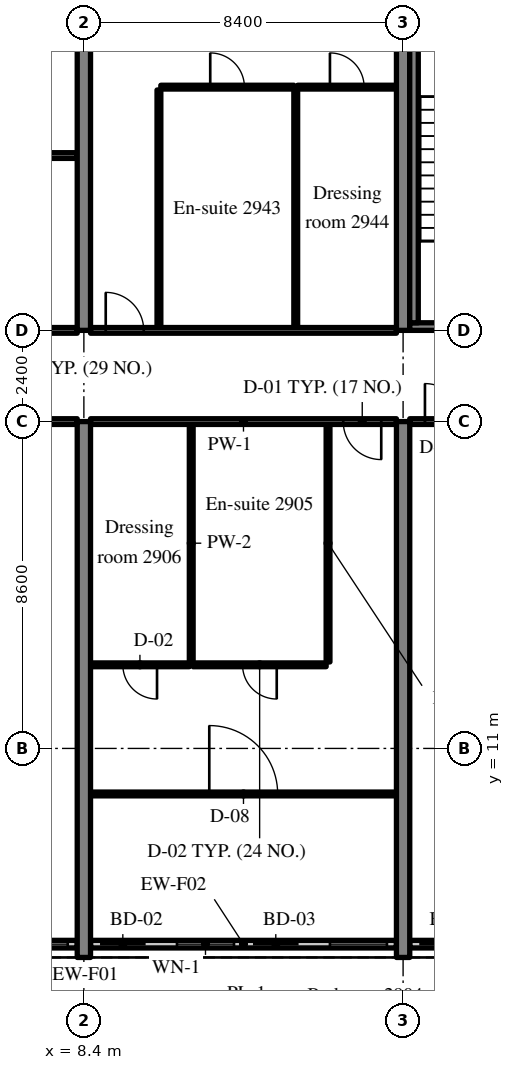
"""IFC4 building model, lengths in metres.
Left out: names, types, materials, properties, quantities, classifications, styles, units other than length and angle.
Written with IfcOpenShell. Run it as: python <this file> out.ifc"""

import sys

from ifc_helpers import new_model, si_unit, direction, frame, frame_2d, origin, place, context, subcontext, project, spatial, rectangle, extrude, source, transform, mapped, element, fill, save


model = new_model("IFC4")
c1 = context("Model", 3, precision=1e-05, world=origin(), true_north=direction((0.0, 1.0)))
c2 = subcontext(c1, "Body", "Model", "MODEL_VIEW")
j1 = project(units=[si_unit("LENGTHUNIT", "METRE"), si_unit("PLANEANGLEUNIT", "RADIAN")], contexts=[c1])
p1 = place(None, origin())
s1 = spatial("IfcSite", under=j1, at=p1, CompositionType="ELEMENT")
p2 = place(p1, origin())
s2 = spatial("IfcBuilding", under=s1, at=p2, CompositionType="ELEMENT")
p3 = place(p2, frame((0.0, 0.0, 121.8)))
s3 = spatial("IfcBuildingStorey", under=s2, at=p3, CompositionType="ELEMENT", Elevation=121.8)
m1 = source(origin(), c2, "Body", "SweptSolid", [
    extrude(rectangle(XDim=14.1, YDim=0.35, at=frame_2d((7.05, 0.0))), origin(), (0.0, 0.0, 1.0), 3.52),
])
p4 = place(p3, frame((8.4, 5.5, 0.0), z_axis=(0.0, 0.0, 1.0), x_axis=(0.0, 1.0, 0.0)))
e1 = element("IfcWall", 1, at=p4, inside=s3, PredefinedType="SHEAR", context=c2, shape_type="MappedRepresentation", body=[
    mapped(m1, transform((0.0, 0.0, 0.0), scale=1.0)),
])
m2 = source(origin(), c2, "Body", "SweptSolid", [
    extrude(rectangle(XDim=20.0, YDim=0.35, at=frame_2d((10.0, 0.0))), origin(), (0.0, 0.0, 1.0), 3.52),
])
p5 = place(p3, frame((8.4, 22.0, 0.0), z_axis=(0.0, 0.0, 1.0), x_axis=(0.0, 1.0, 0.0)))
e2 = element("IfcWall", 2, at=p5, inside=s3, PredefinedType="SHEAR", context=c2, shape_type="MappedRepresentation", body=[
    mapped(m2, transform((0.0, 0.0, 0.0), scale=1.0)),
])
p6 = place(p3, frame((16.8, 5.5, 0.0), z_axis=(0.0, 0.0, 1.0), x_axis=(0.0, 1.0, 0.0)))
e3 = element("IfcWall", 3, at=p6, inside=s3, PredefinedType="SHEAR", context=c2, shape_type="MappedRepresentation", body=[
    mapped(m1, transform((0.0, 0.0, 0.0), scale=1.0)),
])
p7 = place(p3, frame((16.8, 22.0, 0.0), z_axis=(0.0, 0.0, 1.0), x_axis=(0.0, 1.0, 0.0)))
e4 = element("IfcWall", 4, at=p7, inside=s3, PredefinedType="SHEAR", context=c2, shape_type="MappedRepresentation", body=[
    mapped(m2, transform((0.0, 0.0, 0.0), scale=1.0)),
])
m3 = source(origin(), c2, "Body", "SweptSolid", [
    extrude(rectangle(XDim=4.08, YDim=0.2, at=frame_2d((2.04, 0.0))), origin(), (0.0, 0.0, 1.0), 2.82),
])
p8 = place(p3, frame((4.145, 5.85, 0.0), z_axis=(0.0, 0.0, 1.0), x_axis=(1.0, 0.0, 0.0)))
e5 = element("IfcWall", 5, at=p8, inside=s3, PredefinedType="SOLIDWALL", context=c2, shape_type="MappedRepresentation", body=[
    mapped(m3, transform((0.0, 0.0, 0.0), scale=1.0)),
])
m4 = source(origin(), c2, "Body", "SweptSolid", [
    extrude(rectangle(XDim=1.2, YDim=2.4, at=frame_2d((0.6, 1.2))), frame((0.0, 0.11, 0.0), z_axis=(0.0, -1.0, 0.0), x_axis=(1.0, 0.0, 0.0)), (0.0, 0.0, 1.0), 0.22),
])
p9 = place(p8, frame((0.25, 0.0, 0.0)))
e6 = element("IfcOpeningElement", 6, at=p9, cuts=e5, PredefinedType="OPENING", context=c2, shape_type="MappedRepresentation", body=[
    mapped(m4, transform((0.0, 0.0, 0.0), scale=1.0)),
])
m5 = source(origin(), c2, "Body", "SweptSolid", [
    extrude(rectangle(XDim=1.5, YDim=1.5, at=frame_2d((0.75, 0.75))), frame((0.0, 0.11, 0.0), z_axis=(0.0, -1.0, 0.0), x_axis=(1.0, 0.0, 0.0)), (0.0, 0.0, 1.0), 0.22),
])
p10 = place(p8, frame((2.33, 0.0, 0.9)))
e7 = element("IfcOpeningElement", 7, at=p10, cuts=e5, PredefinedType="OPENING", context=c2, shape_type="MappedRepresentation", body=[
    mapped(m5, transform((0.0, 0.0, 0.0), scale=1.0)),
])
m6 = source(origin(), c2, "Body", "SweptSolid", [
    extrude(rectangle(XDim=8.05, YDim=0.2, at=frame_2d((4.025, 0.0))), origin(), (0.0, 0.0, 1.0), 2.82),
])
p11 = place(p3, frame((8.575, 5.85, 0.0), z_axis=(0.0, 0.0, 1.0), x_axis=(1.0, 0.0, 0.0)))
e8 = element("IfcWall", 8, at=p11, inside=s3, PredefinedType="SOLIDWALL", context=c2, shape_type="MappedRepresentation", body=[
    mapped(m6, transform((0.0, 0.0, 0.0), scale=1.0)),
])
p12 = place(p11, frame((0.25, 0.0, 0.0)))
e9 = element("IfcOpeningElement", 9, at=p12, cuts=e8, PredefinedType="OPENING", context=c2, shape_type="MappedRepresentation", body=[
    mapped(m4, transform((0.0, 0.0, 0.0), scale=1.0)),
])
p13 = place(p11, frame((2.275, 0.0, 0.9)))
e10 = element("IfcOpeningElement", 10, at=p13, cuts=e8, PredefinedType="OPENING", context=c2, shape_type="MappedRepresentation", body=[
    mapped(m5, transform((0.0, 0.0, 0.0), scale=1.0)),
])
p14 = place(p11, frame((4.275, 0.0, 0.0)))
e11 = element("IfcOpeningElement", 11, at=p14, cuts=e8, PredefinedType="OPENING", context=c2, shape_type="MappedRepresentation", body=[
    mapped(m4, transform((0.0, 0.0, 0.0), scale=1.0)),
])
p15 = place(p11, frame((6.3, 0.0, 0.9)))
e12 = element("IfcOpeningElement", 12, at=p15, cuts=e8, PredefinedType="OPENING", context=c2, shape_type="MappedRepresentation", body=[
    mapped(m5, transform((0.0, 0.0, 0.0), scale=1.0)),
])
m7 = source(origin(), c2, "Body", "SweptSolid", [
    extrude(rectangle(XDim=8.05, YDim=0.2, at=frame_2d((4.025, 0.0))), origin(), (0.0, 0.0, 1.0), 2.82),
])
p16 = place(p3, frame((16.975, 5.85, 0.0), z_axis=(0.0, 0.0, 1.0), x_axis=(1.0, 0.0, 0.0)))
e13 = element("IfcWall", 13, at=p16, inside=s3, PredefinedType="SOLIDWALL", context=c2, shape_type="MappedRepresentation", body=[
    mapped(m7, transform((0.0, 0.0, 0.0), scale=1.0)),
])
p17 = place(p16, frame((0.25, 0.0, 0.0)))
e14 = element("IfcOpeningElement", 14, at=p17, cuts=e13, PredefinedType="OPENING", context=c2, shape_type="MappedRepresentation", body=[
    mapped(m4, transform((0.0, 0.0, 0.0), scale=1.0)),
])
p18 = place(p16, frame((2.275, 0.0, 0.9)))
e15 = element("IfcOpeningElement", 15, at=p18, cuts=e13, PredefinedType="OPENING", context=c2, shape_type="MappedRepresentation", body=[
    mapped(m5, transform((0.0, 0.0, 0.0), scale=1.0)),
])
p19 = place(p16, frame((4.275, 0.0, 0.0)))
e16 = element("IfcOpeningElement", 16, at=p19, cuts=e13, PredefinedType="OPENING", context=c2, shape_type="MappedRepresentation", body=[
    mapped(m4, transform((0.0, 0.0, 0.0), scale=1.0)),
])
p20 = place(p16, frame((6.3, 0.0, 0.9)))
e17 = element("IfcOpeningElement", 17, at=p20, cuts=e13, PredefinedType="OPENING", context=c2, shape_type="MappedRepresentation", body=[
    mapped(m5, transform((0.0, 0.0, 0.0), scale=1.0)),
])
m8 = source(origin(), c2, "Body", "SweptSolid", [
    extrude(rectangle(XDim=8.225, YDim=0.2, at=frame_2d((4.112, 0.0))), origin(), (0.0, 0.0, 1.0), 3.52),
])
p21 = place(p3, frame((16.975, 22.1, 0.0), z_axis=(0.0, 0.0, 1.0), x_axis=(1.0, 0.0, 0.0)))
e18 = element("IfcWall", 18, at=p21, inside=s3, PredefinedType="SOLIDWALL", context=c2, shape_type="MappedRepresentation", body=[
    mapped(m8, transform((0.0, 0.0, 0.0), scale=1.0)),
])
m9 = source(origin(), c2, "Body", "SweptSolid", [
    extrude(rectangle(XDim=1.2, YDim=2.1, at=frame_2d((0.6, 1.05))), frame((0.0, 0.11, 0.0), z_axis=(0.0, -1.0, 0.0), x_axis=(1.0, 0.0, 0.0)), (0.0, 0.0, 1.0), 0.22),
])
p22 = place(p21, frame((6.025, 0.0, 0.0)))
e19 = element("IfcOpeningElement", 19, at=p22, cuts=e18, PredefinedType="OPENING", context=c2, shape_type="MappedRepresentation", body=[
    mapped(m9, transform((0.0, 0.0, 0.0), scale=1.0)),
])
m10 = source(origin(), c2, "Body", "SweptSolid", [
    extrude(rectangle(XDim=8.1, YDim=0.225, at=frame_2d((4.05, 0.0))), origin(), (0.0, 0.0, 1.0), 3.52),
])
p23 = place(p3, frame((17.087, 22.2, 0.0), z_axis=(0.0, 0.0, 1.0), x_axis=(0.0, 1.0, 0.0)))
e20 = element("IfcWall", 20, at=p23, inside=s3, PredefinedType="SOLIDWALL", context=c2, shape_type="MappedRepresentation", body=[
    mapped(m10, transform((0.0, 0.0, 0.0), scale=1.0)),
])
m11 = source(origin(), c2, "Body", "SweptSolid", [
    extrude(rectangle(XDim=7.875, YDim=0.15, at=frame_2d((3.938, 0.0))), origin(), (0.0, 0.0, 1.0), 2.82),
])
p24 = place(p3, frame((0.35, 19.6, 0.0), z_axis=(0.0, 0.0, 1.0), x_axis=(1.0, 0.0, 0.0)))
e21 = element("IfcWall", 21, at=p24, inside=s3, PredefinedType="PARTITIONING", context=c2, shape_type="MappedRepresentation", body=[
    mapped(m11, transform((0.0, 0.0, 0.0), scale=1.0)),
])
m12 = source(origin(), c2, "Body", "SweptSolid", [
    extrude(rectangle(XDim=1.8, YDim=2.1, at=frame_2d((0.9, 1.05))), frame((0.0, 0.085, 0.0), z_axis=(0.0, -1.0, 0.0), x_axis=(1.0, 0.0, 0.0)), (0.0, 0.0, 1.0), 0.17),
])
p25 = place(p24, frame((3.037, 0.0, 0.0)))
e22 = element("IfcOpeningElement", 22, at=p25, cuts=e21, PredefinedType="OPENING", context=c2, shape_type="MappedRepresentation", body=[
    mapped(m12, transform((0.0, 0.0, 0.0), scale=1.0)),
])
m13 = source(origin(), c2, "Body", "SweptSolid", [
    extrude(rectangle(XDim=6.25, YDim=0.1, at=frame_2d((3.125, 0.0))), origin(), (0.0, 0.0, 1.0), 3.52),
])
for number, where, z_axis, x_axis in (
    (23, (14.825, 13.275, 0.0), (0.0, 0.0, 1.0), (0.0, 1.0, 0.0)),
    (24, (11.225, 13.275, 0.0), (0.0, 0.0, 1.0), (0.0, 1.0, 0.0)),
):
    element("IfcWall", number, at=place(p3, frame(where, z_axis=z_axis, x_axis=x_axis)), inside=s3, PredefinedType="PARTITIONING", context=c2, shape_type="MappedRepresentation", body=[
        mapped(m13, transform((0.0, 0.0, 0.0), scale=1.0)),
    ])
m14 = source(origin(), c2, "Body", "SweptSolid", [
    extrude(rectangle(XDim=3.5, YDim=0.1, at=frame_2d((1.75, 0.0))), origin(), (0.0, 0.0, 1.0), 3.52),
])
p26 = place(p3, frame((11.275, 13.2, 0.0), z_axis=(0.0, 0.0, 1.0), x_axis=(1.0, 0.0, 0.0)))
e25 = element("IfcWall", 25, at=p26, inside=s3, PredefinedType="PARTITIONING", context=c2, shape_type="MappedRepresentation", body=[
    mapped(m14, transform((0.0, 0.0, 0.0), scale=1.0)),
])
m15 = source(origin(), c2, "Body", "SweptSolid", [
    extrude(rectangle(XDim=0.9, YDim=2.1, at=frame_2d((0.45, 1.05))), frame((0.0, 0.06, 0.0), z_axis=(0.0, -1.0, 0.0), x_axis=(1.0, 0.0, 0.0)), (0.0, 0.0, 1.0), 0.12),
])
p27 = place(p26, frame((1.3, 0.0, 0.0)))
e26 = element("IfcOpeningElement", 26, at=p27, cuts=e25, PredefinedType="OPENING", context=c2, shape_type="MappedRepresentation", body=[
    mapped(m15, transform((0.0, 0.0, 0.0), scale=1.0)),
])
m16 = source(origin(), c2, "Body", "SweptSolid", [
    extrude(rectangle(XDim=2.6, YDim=0.1, at=frame_2d((1.3, 0.0))), origin(), (0.0, 0.0, 1.0), 3.52),
])
p28 = place(p3, frame((8.575, 13.2, 0.0), z_axis=(0.0, 0.0, 1.0), x_axis=(1.0, 0.0, 0.0)))
e27 = element("IfcWall", 27, at=p28, inside=s3, PredefinedType="PARTITIONING", context=c2, shape_type="MappedRepresentation", body=[
    mapped(m16, transform((0.0, 0.0, 0.0), scale=1.0)),
])
p29 = place(p28, frame((0.85, 0.0, 0.0)))
e28 = element("IfcOpeningElement", 28, at=p29, cuts=e27, PredefinedType="OPENING", context=c2, shape_type="MappedRepresentation", body=[
    mapped(m15, transform((0.0, 0.0, 0.0), scale=1.0)),
])
m17 = source(origin(), c2, "Body", "SweptSolid", [
    extrude(rectangle(XDim=8.05, YDim=0.1, at=frame_2d((4.025, 0.0))), origin(), (0.0, 0.0, 1.0), 3.52),
])
p30 = place(p3, frame((8.575, 9.802, 0.0), z_axis=(0.0, 0.0, 1.0), x_axis=(1.0, 0.0, 0.0)))
e29 = element("IfcWall", 29, at=p30, inside=s3, PredefinedType="PARTITIONING", context=c2, shape_type="MappedRepresentation", body=[
    mapped(m17, transform((0.0, 0.0, 0.0), scale=1.0)),
])
m18 = source(origin(), c2, "Body", "SweptSolid", [
    extrude(rectangle(XDim=1.8, YDim=2.1, at=frame_2d((0.9, 1.05))), frame((0.0, 0.06, 0.0), z_axis=(0.0, -1.0, 0.0), x_axis=(1.0, 0.0, 0.0)), (0.0, 0.0, 1.0), 0.12),
])
p31 = place(p30, frame((3.125, 0.0, 0.0)))
e30 = element("IfcOpeningElement", 30, at=p31, cuts=e29, PredefinedType="OPENING", context=c2, shape_type="MappedRepresentation", body=[
    mapped(m18, transform((0.0, 0.0, 0.0), scale=1.0)),
])
m19 = source(origin(), c2, "Body", "SweptSolid", [
    extrude(rectangle(XDim=8.05, YDim=0.15, at=frame_2d((4.025, 0.0))), origin(), (0.0, 0.0, 1.0), 2.82),
])
p32 = place(p3, frame((8.575, 19.6, 0.0), z_axis=(0.0, 0.0, 1.0), x_axis=(1.0, 0.0, 0.0)))
e31 = element("IfcWall", 31, at=p32, inside=s3, PredefinedType="PARTITIONING", context=c2, shape_type="MappedRepresentation", body=[
    mapped(m19, transform((0.0, 0.0, 0.0), scale=1.0)),
])
m20 = source(origin(), c2, "Body", "SweptSolid", [
    extrude(rectangle(XDim=1.0, YDim=2.1, at=frame_2d((0.5, 1.05))), frame((0.0, 0.085, 0.0), z_axis=(0.0, -1.0, 0.0), x_axis=(1.0, 0.0, 0.0)), (0.0, 0.0, 1.0), 0.17),
])
p33 = place(p32, frame((6.65, 0.0, 0.0)))
e32 = element("IfcOpeningElement", 32, at=p33, cuts=e31, PredefinedType="OPENING", context=c2, shape_type="MappedRepresentation", body=[
    mapped(m20, transform((0.0, 0.0, 0.0), scale=1.0)),
])
m21 = source(origin(), c2, "Body", "SweptSolid", [
    extrude(rectangle(XDim=8.05, YDim=0.15, at=frame_2d((4.025, 0.0))), origin(), (0.0, 0.0, 1.0), 2.82),
])
p34 = place(p3, frame((16.975, 19.6, 0.0), z_axis=(0.0, 0.0, 1.0), x_axis=(1.0, 0.0, 0.0)))
e33 = element("IfcWall", 33, at=p34, inside=s3, PredefinedType="PARTITIONING", context=c2, shape_type="MappedRepresentation", body=[
    mapped(m21, transform((0.0, 0.0, 0.0), scale=1.0)),
])
p35 = place(p34, frame((0.4, 0.0, 0.0)))
e34 = element("IfcOpeningElement", 34, at=p35, cuts=e33, PredefinedType="OPENING", context=c2, shape_type="MappedRepresentation", body=[
    mapped(m20, transform((0.0, 0.0, 0.0), scale=1.0)),
])
m22 = source(origin(), c2, "Body", "SweptSolid", [
    extrude(rectangle(XDim=5.325, YDim=0.15, at=frame_2d((2.663, 0.0))), origin(), (0.0, 0.0, 1.0), 2.82),
])
p36 = place(p3, frame((2.9, 22.0, 0.0), z_axis=(0.0, 0.0, 1.0), x_axis=(1.0, 0.0, 0.0)))
e35 = element("IfcWall", 35, at=p36, inside=s3, PredefinedType="PARTITIONING", context=c2, shape_type="MappedRepresentation", body=[
    mapped(m22, transform((0.0, 0.0, 0.0), scale=1.0)),
])
m23 = source(origin(), c2, "Body", "SweptSolid", [
    extrude(rectangle(XDim=5.325, YDim=0.15, at=frame_2d((2.663, 0.0))), origin(), (0.0, 0.0, 1.0), 3.52),
])
p37 = place(p3, frame((2.9, 26.6, 0.0), z_axis=(0.0, 0.0, 1.0), x_axis=(1.0, 0.0, 0.0)))
e36 = element("IfcWall", 36, at=p37, inside=s3, PredefinedType="PARTITIONING", context=c2, shape_type="MappedRepresentation", body=[
    mapped(m23, transform((0.0, 0.0, 0.0), scale=1.0)),
])
for number, where, z_axis, x_axis in (
    (37, (10.375, 22.075, 0.0), (0.0, 0.0, 1.0), (0.0, 1.0, 0.0)),
    (38, (13.975, 22.075, 0.0), (0.0, 0.0, 1.0), (0.0, 1.0, 0.0)),
):
    element("IfcWall", number, at=place(p3, frame(where, z_axis=z_axis, x_axis=x_axis)), inside=s3, PredefinedType="PARTITIONING", context=c2, shape_type="MappedRepresentation", body=[
        mapped(m13, transform((0.0, 0.0, 0.0), scale=1.0)),
    ])
p38 = place(p3, frame((10.425, 28.4, 0.0), z_axis=(0.0, 0.0, 1.0), x_axis=(1.0, 0.0, 0.0)))
e39 = element("IfcWall", 39, at=p38, inside=s3, PredefinedType="PARTITIONING", context=c2, shape_type="MappedRepresentation", body=[
    mapped(m14, transform((0.0, 0.0, 0.0), scale=1.0)),
])
p39 = place(p38, frame((1.3, 0.0, 0.0)))
e40 = element("IfcOpeningElement", 40, at=p39, cuts=e39, PredefinedType="OPENING", context=c2, shape_type="MappedRepresentation", body=[
    mapped(m15, transform((0.0, 0.0, 0.0), scale=1.0)),
])
p40 = place(p3, frame((14.025, 28.4, 0.0), z_axis=(0.0, 0.0, 1.0), x_axis=(1.0, 0.0, 0.0)))
e41 = element("IfcWall", 41, at=p40, inside=s3, PredefinedType="PARTITIONING", context=c2, shape_type="MappedRepresentation", body=[
    mapped(m16, transform((0.0, 0.0, 0.0), scale=1.0)),
])
p41 = place(p40, frame((0.85, 0.0, 0.0)))
e42 = element("IfcOpeningElement", 42, at=p41, cuts=e41, PredefinedType="OPENING", context=c2, shape_type="MappedRepresentation", body=[
    mapped(m15, transform((0.0, 0.0, 0.0), scale=1.0)),
])
p42 = place(p3, frame((8.575, 22.0, 0.0), z_axis=(0.0, 0.0, 1.0), x_axis=(1.0, 0.0, 0.0)))
e43 = element("IfcWall", 43, at=p42, inside=s3, PredefinedType="PARTITIONING", context=c2, shape_type="MappedRepresentation", body=[
    mapped(m19, transform((0.0, 0.0, 0.0), scale=1.0)),
])
p43 = place(p42, frame((0.4, 0.0, 0.0)))
e44 = element("IfcOpeningElement", 44, at=p43, cuts=e43, PredefinedType="OPENING", context=c2, shape_type="MappedRepresentation", body=[
    mapped(m20, transform((0.0, 0.0, 0.0), scale=1.0)),
])
m24 = source(origin(), c2, "Body", "SweptSolid", [
    extrude(rectangle(XDim=1.5, YDim=1.5, at=frame_2d((0.75, 0.75))), frame((0.0, 0.03, 0.0), z_axis=(0.0, -1.0, 0.0), x_axis=(1.0, 0.0, 0.0)), (0.0, 0.0, 1.0), 0.06),
])
p44 = place(p10, origin())
e45 = element("IfcWindow", 45, at=p44, inside=s3, PartitioningType="SINGLE_PANEL", PredefinedType="WINDOW", context=c2, shape_type="MappedRepresentation", body=[
    mapped(m24, transform((0.0, 0.0, 0.0), scale=1.0)),
])
fill(e7, e45)
m25 = source(origin(), c2, "Body", "SweptSolid", [
    extrude(rectangle(XDim=1.2, YDim=2.4, at=frame_2d((0.6, 1.2))), frame((0.0, 0.025, 0.0), z_axis=(0.0, -1.0, 0.0), x_axis=(1.0, 0.0, 0.0)), (0.0, 0.0, 1.0), 0.05),
])
p45 = place(p12, origin())
e46 = element("IfcDoor", 46, at=p45, inside=s3, OperationType="SLIDING_TO_RIGHT", PredefinedType="DOOR", context=c2, shape_type="MappedRepresentation", body=[
    mapped(m25, transform((0.0, 0.0, 0.0), scale=1.0)),
])
fill(e9, e46)
p46 = place(p13, origin())
e47 = element("IfcWindow", 47, at=p46, inside=s3, PartitioningType="SINGLE_PANEL", PredefinedType="WINDOW", context=c2, shape_type="MappedRepresentation", body=[
    mapped(m24, transform((0.0, 0.0, 0.0), scale=1.0)),
])
fill(e10, e47)
p47 = place(p14, origin())
e48 = element("IfcDoor", 48, at=p47, inside=s3, OperationType="SLIDING_TO_LEFT", PredefinedType="DOOR", context=c2, shape_type="MappedRepresentation", body=[
    mapped(m25, transform((0.0, 0.0, 0.0), scale=1.0)),
])
fill(e11, e48)
p48 = place(p15, origin())
e49 = element("IfcWindow", 49, at=p48, inside=s3, PartitioningType="SINGLE_PANEL", PredefinedType="WINDOW", context=c2, shape_type="MappedRepresentation", body=[
    mapped(m24, transform((0.0, 0.0, 0.0), scale=1.0)),
])
fill(e12, e49)
p49 = place(p17, origin())
e50 = element("IfcDoor", 50, at=p49, inside=s3, OperationType="SLIDING_TO_RIGHT", PredefinedType="DOOR", context=c2, shape_type="MappedRepresentation", body=[
    mapped(m25, transform((0.0, 0.0, 0.0), scale=1.0)),
])
fill(e14, e50)
m26 = source(origin(), c2, "Body", "SweptSolid", [
    extrude(rectangle(XDim=0.9, YDim=2.1, at=frame_2d((0.45, 1.05))), frame((0.0, 0.025, 0.0), z_axis=(0.0, -1.0, 0.0), x_axis=(1.0, 0.0, 0.0)), (0.0, 0.0, 1.0), 0.05),
])
p50 = place(p27, origin())
e51 = element("IfcDoor", 51, at=p50, inside=s3, OperationType="SINGLE_SWING_RIGHT", PredefinedType="DOOR", context=c2, shape_type="MappedRepresentation", body=[
    mapped(m26, transform((0.0, 0.0, 0.0), scale=1.0)),
])
fill(e26, e51)
p51 = place(p29, origin())
e52 = element("IfcDoor", 52, at=p51, inside=s3, OperationType="SINGLE_SWING_RIGHT", PredefinedType="DOOR", context=c2, shape_type="MappedRepresentation", body=[
    mapped(m26, transform((0.0, 0.0, 0.0), scale=1.0)),
])
fill(e28, e52)
m27 = source(origin(), c2, "Body", "SweptSolid", [
    extrude(rectangle(XDim=1.8, YDim=2.1, at=frame_2d((0.9, 1.05))), frame((0.0, 0.025, 0.0), z_axis=(0.0, -1.0, 0.0), x_axis=(1.0, 0.0, 0.0)), (0.0, 0.0, 1.0), 0.05),
])
p52 = place(p31, origin())
e53 = element("IfcDoor", 53, at=p52, inside=s3, OperationType="DOUBLE_DOOR_SINGLE_SWING", PredefinedType="DOOR", context=c2, shape_type="MappedRepresentation", body=[
    mapped(m27, transform((0.0, 0.0, 0.0), scale=1.0)),
])
fill(e30, e53)
m28 = source(origin(), c2, "Body", "SweptSolid", [
    extrude(rectangle(XDim=1.0, YDim=2.1, at=frame_2d((0.5, 1.05))), frame((0.0, 0.025, 0.0), z_axis=(0.0, -1.0, 0.0), x_axis=(1.0, 0.0, 0.0)), (0.0, 0.0, 1.0), 0.05),
])
p53 = place(p33, origin())
e54 = element("IfcDoor", 54, at=p53, inside=s3, OperationType="SINGLE_SWING_RIGHT", PredefinedType="DOOR", context=c2, shape_type="MappedRepresentation", body=[
    mapped(m28, transform((0.0, 0.0, 0.0), scale=1.0)),
])
fill(e32, e54)
p54 = place(p35, origin())
e55 = element("IfcDoor", 55, at=p54, inside=s3, OperationType="SINGLE_SWING_LEFT", PredefinedType="DOOR", context=c2, shape_type="MappedRepresentation", body=[
    mapped(m28, transform((0.0, 0.0, 0.0), scale=1.0)),
])
fill(e34, e55)
p55 = place(p39, origin())
e56 = element("IfcDoor", 56, at=p55, inside=s3, OperationType="SINGLE_SWING_LEFT", PredefinedType="DOOR", context=c2, shape_type="MappedRepresentation", body=[
    mapped(m26, transform((0.0, 0.0, 0.0), scale=1.0)),
])
fill(e40, e56)
p56 = place(p41, origin())
e57 = element("IfcDoor", 57, at=p56, inside=s3, OperationType="SINGLE_SWING_LEFT", PredefinedType="DOOR", context=c2, shape_type="MappedRepresentation", body=[
    mapped(m26, transform((0.0, 0.0, 0.0), scale=1.0)),
])
fill(e42, e57)
p57 = place(p43, origin())
e58 = element("IfcDoor", 58, at=p57, inside=s3, OperationType="SINGLE_SWING_LEFT", PredefinedType="DOOR", context=c2, shape_type="MappedRepresentation", body=[
    mapped(m28, transform((0.0, 0.0, 0.0), scale=1.0)),
])
fill(e44, e58)
save(model, sys.argv[1])
